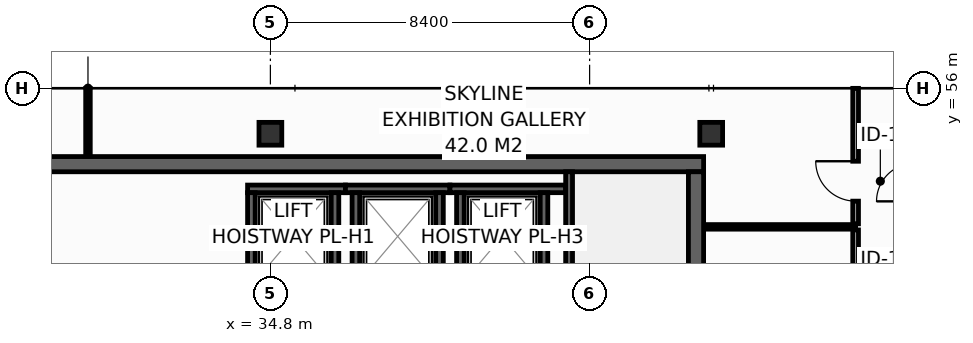
"""IFC4 building model, lengths in metres.
Left out: names, types, materials, properties, quantities, classifications, styles, units other than length and angle.
Written with IfcOpenShell. Run it as: python <this file> out.ifc"""

import sys

from ifc_helpers import new_model, si_unit, direction, frame, frame_2d, origin, origin_2d, place, context, subcontext, project, spatial, rectangle, hollow_rectangle, extrude, element, fill, save


model = new_model("IFC4")
c1 = context("Model", 3, precision=1e-05, world=origin(), true_north=direction((0.0, 1.0)))
c2 = subcontext(c1, "Body", "Model", "MODEL_VIEW")
j1 = project(units=[si_unit("LENGTHUNIT", "METRE"), si_unit("PLANEANGLEUNIT", "RADIAN")], contexts=[c1])
p1 = place(None, origin())
s1 = spatial("IfcSite", under=j1, at=p1, CompositionType="ELEMENT")
p2 = place(p1, origin())
s2 = spatial("IfcBuilding", under=s1, at=p2, CompositionType="ELEMENT")
p3 = place(p2, frame((0.0, 0.0, 299.0)))
s3 = spatial("IfcBuildingStorey", under=s2, at=p3, CompositionType="ELEMENT", Elevation=299.0)
p4 = place(p3, frame((13.7, 54.0, 0.0), z_axis=(0.0, 0.0, 1.0), x_axis=(1.0, 0.0, 0.0)))
e1 = element("IfcWall", 1, at=p4, inside=s3, PredefinedType="SHEAR", context=c2, shape_type="SweptSolid", body=[
    extrude(rectangle(XDim=32.5, YDim=0.4, at=frame_2d((16.25, 0.0))), origin(), (0.0, 0.0, 1.0), 3.55),
])
p5 = place(p3, frame((46.0, 43.4, 0.0), z_axis=(0.0, 0.0, 1.0), x_axis=(0.0, 1.0, 0.0)))
e2 = element("IfcWall", 2, at=p5, inside=s3, PredefinedType="SHEAR", context=c2, shape_type="SweptSolid", body=[
    extrude(rectangle(XDim=10.4, YDim=0.4, at=frame_2d((5.2, 0.0))), origin(), (0.0, 0.0, 1.0), 3.55),
])
for number, where, z_axis, x_axis in (
    (3, (34.8, 54.8, 0.0), (0.0, 0.0, 1.0), (1.0, 0.0, 0.0)),
    (4, (46.4, 54.8, 0.0), (0.0, 0.0, 1.0), (1.0, 0.0, 0.0)),
):
    element("IfcColumn", number, at=place(p3, frame(where, z_axis=z_axis, x_axis=x_axis)), inside=s3, PredefinedType="COLUMN", context=c2, shape_type="SweptSolid", body=[
        extrude(hollow_rectangle(XDim=0.6, YDim=0.6, WallThickness=0.028, at=origin_2d()), origin(), (0.0, 0.0, 1.0), 3.8),
    ])
p6 = place(p3, frame((34.2, 53.35, 0.0), z_axis=(0.0, 0.0, 1.0), x_axis=(1.0, 0.0, 0.0)))
e5 = element("IfcWall", 5, at=p6, inside=s3, PredefinedType="SHEAR", context=c2, shape_type="SweptSolid", body=[
    extrude(rectangle(XDim=2.575, YDim=0.2, at=frame_2d((1.288, 0.0))), origin(), (0.0, 0.0, 1.0), 3.55),
])
for number, where, z_axis, x_axis in (
    (6, (34.3, 50.95, 0.0), (0.0, 0.0, 1.0), (0.0, 1.0, 0.0)),
    (7, (36.5, 50.95, 0.0), (0.0, 0.0, 1.0), (0.0, 1.0, 0.0)),
):
    element("IfcWall", number, at=place(p3, frame(where, z_axis=z_axis, x_axis=x_axis)), inside=s3, PredefinedType="SHEAR", context=c2, shape_type="SweptSolid", body=[
        extrude(rectangle(XDim=2.3, YDim=0.2, at=frame_2d((1.15, 0.0))), origin(), (0.0, 0.0, 1.0), 3.55),
    ])
p7 = place(p3, frame((36.775, 53.35, 0.0), z_axis=(0.0, 0.0, 1.0), x_axis=(1.0, 0.0, 0.0)))
e8 = element("IfcWall", 8, at=p7, inside=s3, PredefinedType="SHEAR", context=c2, shape_type="SweptSolid", body=[
    extrude(rectangle(XDim=2.75, YDim=0.2, at=frame_2d((1.375, 0.0))), origin(), (0.0, 0.0, 1.0), 3.55),
])
for number, where, z_axis, x_axis in (
    (9, (37.05, 50.95, 0.0), (0.0, 0.0, 1.0), (0.0, 1.0, 0.0)),
    (10, (39.25, 50.95, 0.0), (0.0, 0.0, 1.0), (0.0, 1.0, 0.0)),
):
    element("IfcWall", number, at=place(p3, frame(where, z_axis=z_axis, x_axis=x_axis)), inside=s3, PredefinedType="SHEAR", context=c2, shape_type="SweptSolid", body=[
        extrude(rectangle(XDim=2.3, YDim=0.2, at=frame_2d((1.15, 0.0))), origin(), (0.0, 0.0, 1.0), 3.55),
    ])
p8 = place(p3, frame((39.525, 53.35, 0.0), z_axis=(0.0, 0.0, 1.0), x_axis=(1.0, 0.0, 0.0)))
e11 = element("IfcWall", 11, at=p8, inside=s3, PredefinedType="SHEAR", context=c2, shape_type="SweptSolid", body=[
    extrude(rectangle(XDim=3.045, YDim=0.2, at=frame_2d((1.522, 0.0))), origin(), (0.0, 0.0, 1.0), 3.55),
])
for number, where, z_axis, x_axis in (
    (12, (39.8, 50.95, 0.0), (0.0, 0.0, 1.0), (0.0, 1.0, 0.0)),
    (13, (42.0, 50.95, 0.0), (0.0, 0.0, 1.0), (0.0, 1.0, 0.0)),
):
    element("IfcWall", number, at=place(p3, frame(where, z_axis=z_axis, x_axis=x_axis)), inside=s3, PredefinedType="SHEAR", context=c2, shape_type="SweptSolid", body=[
        extrude(rectangle(XDim=2.3, YDim=0.2, at=frame_2d((1.15, 0.0))), origin(), (0.0, 0.0, 1.0), 3.55),
    ])
p9 = place(p3, frame((42.66, 53.8, 0.0), z_axis=(0.0, 0.0, 1.0), x_axis=(0.0, -1.0, 0.0)))
e14 = element("IfcWall", 14, at=p9, inside=s3, PredefinedType="SHEAR", context=c2, shape_type="SweptSolid", body=[
    extrude(rectangle(XDim=10.4, YDim=0.18, at=frame_2d((5.2, 0.0))), origin(), (0.0, 0.0, 1.0), 3.55),
])
p10 = place(p9, frame((8.99, 0.0, 0.0)))
e15 = element("IfcOpeningElement", 15, at=p10, cuts=e14, PredefinedType="OPENING", context=c2, shape_type="SweptSolid", body=[
    extrude(rectangle(XDim=1.1, YDim=2.15, at=frame_2d((0.55, 1.075))), frame((0.0, 0.1, 0.0), z_axis=(0.0, -1.0, 0.0), x_axis=(1.0, 0.0, 0.0)), (0.0, 0.0, 1.0), 0.2),
])
p11 = place(p3, frame((46.22, 52.35, 0.0), z_axis=(0.0, 0.0, 1.0), x_axis=(1.0, 0.0, 0.0)))
e16 = element("IfcWall", 16, at=p11, inside=s3, PredefinedType="PARTITIONING", context=c2, shape_type="SweptSolid", body=[
    extrude(rectangle(XDim=3.98, YDim=0.12, at=frame_2d((1.99, 0.0))), origin(), (0.0, 0.0, 1.0), 3.55),
])
p12 = place(p3, frame((30.0, 54.22, 0.0), z_axis=(0.0, 0.0, 1.0), x_axis=(0.0, 1.0, 0.0)))
e17 = element("IfcWall", 17, at=p12, inside=s3, PredefinedType="PARTITIONING", context=c2, shape_type="SweptSolid", body=[
    extrude(rectangle(XDim=1.775, YDim=0.12, at=frame_2d((0.888, 0.0))), origin(), (0.0, 0.0, 1.0), 2.935),
])
p13 = place(p3, frame((50.2, 48.29, 0.0), z_axis=(0.0, 0.0, 1.0), x_axis=(0.0, 1.0, 0.0)))
e18 = element("IfcWall", 18, at=p13, inside=s3, PredefinedType="PARTITIONING", context=c2, shape_type="SweptSolid", body=[
    extrude(rectangle(XDim=3.98, YDim=0.15, at=frame_2d((1.99, 0.0))), origin(), (0.0, 0.0, 1.0), 3.55),
])
p14 = place(p13, frame((1.465, 0.0, 0.0)))
e19 = element("IfcOpeningElement", 19, at=p14, cuts=e18, PredefinedType="OPENING", context=c2, shape_type="SweptSolid", body=[
    extrude(rectangle(XDim=1.05, YDim=2.15, at=frame_2d((0.525, 1.075))), frame((0.0, 0.085, 0.0), z_axis=(0.0, -1.0, 0.0), x_axis=(1.0, 0.0, 0.0)), (0.0, 0.0, 1.0), 0.17),
])
p15 = place(p3, frame((50.2, 52.43, 0.0), z_axis=(0.0, 0.0, 1.0), x_axis=(0.0, 1.0, 0.0)))
e20 = element("IfcWall", 20, at=p15, inside=s3, PredefinedType="PARTITIONING", context=c2, shape_type="SweptSolid", body=[
    extrude(rectangle(XDim=3.565, YDim=0.15, at=frame_2d((1.783, 0.0))), origin(), (0.0, 0.0, 1.0), 2.935),
])
p16 = place(p15, frame((0.597, 0.0, 0.0)))
e21 = element("IfcOpeningElement", 21, at=p16, cuts=e20, PredefinedType="OPENING", context=c2, shape_type="SweptSolid", body=[
    extrude(rectangle(XDim=1.05, YDim=2.15, at=frame_2d((0.525, 1.075))), frame((0.0, 0.085, 0.0), z_axis=(0.0, -1.0, 0.0), x_axis=(1.0, 0.0, 0.0)), (0.0, 0.0, 1.0), 0.17),
])
p17 = place(p16, origin())
e22 = element("IfcDoor", 22, at=p17, inside=s3, OperationType="SINGLE_SWING_RIGHT", PredefinedType="DOOR", context=c2, shape_type="SweptSolid", body=[
    extrude(rectangle(XDim=1.05, YDim=2.15, at=frame_2d((0.525, 1.075))), frame((0.0, 0.025, 0.0), z_axis=(0.0, -1.0, 0.0), x_axis=(1.0, 0.0, 0.0)), (0.0, 0.0, 1.0), 0.05),
])
fill(e21, e22)
save(model, sys.argv[1])
